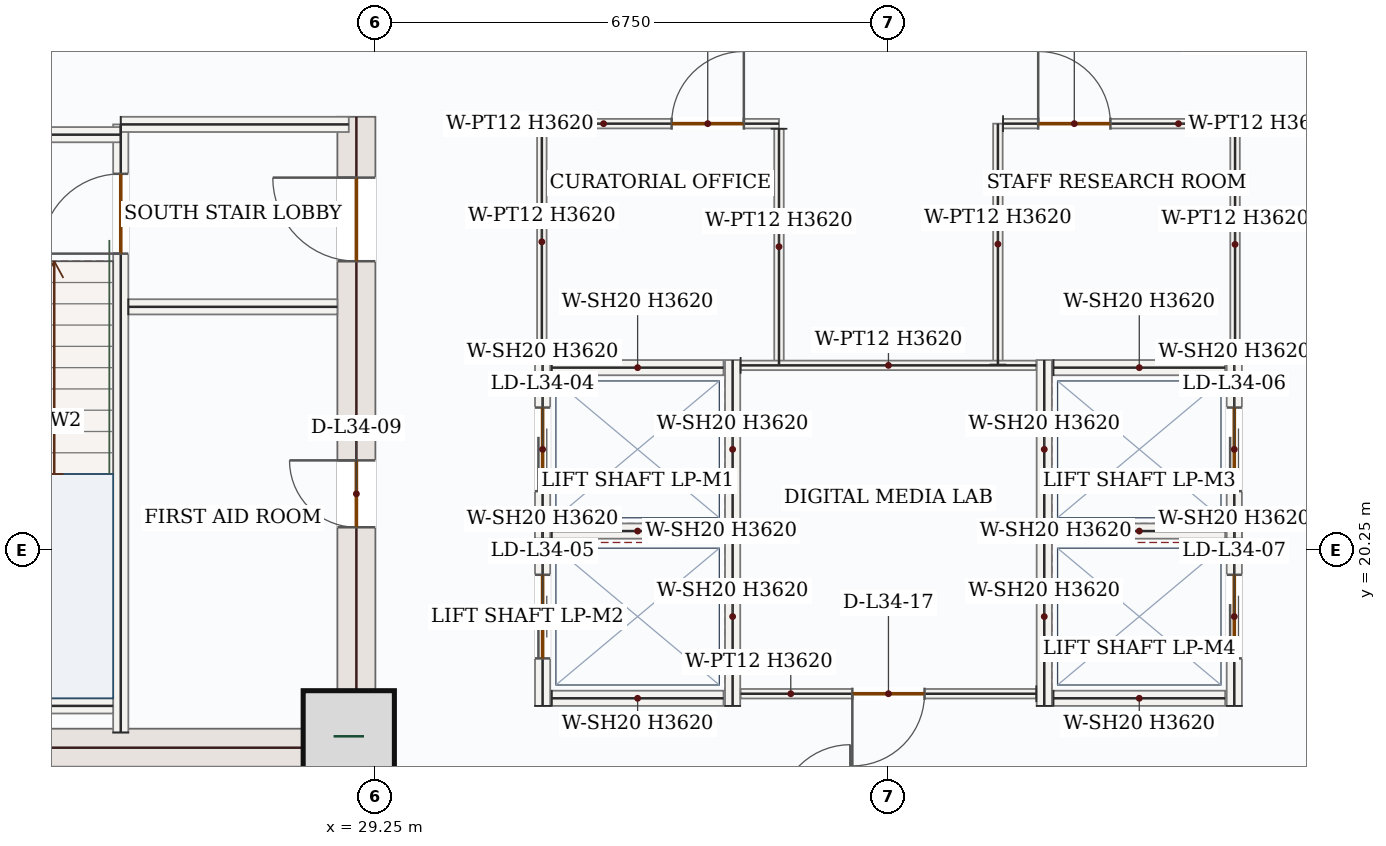
"""IFC4 building model, lengths in metres.
Left out: names, types, materials, properties, quantities, classifications, styles, units other than length and angle.
Written with IfcOpenShell. Run it as: python <this file> out.ifc"""

import sys

from ifc_helpers import new_model, si_unit, direction, frame, frame_2d, origin, origin_2d, place, context, subcontext, project, spatial, rectangle, extrude, source, transform, mapped, element, fill, save


model = new_model("IFC4")
c1 = context("Model", 3, precision=1e-05, world=origin(), true_north=direction((0.0, 1.0)))
c2 = subcontext(c1, "Body", "Model", "MODEL_VIEW")
j1 = project(units=[si_unit("LENGTHUNIT", "METRE"), si_unit("PLANEANGLEUNIT", "RADIAN")], contexts=[c1])
p1 = place(None, origin())
s1 = spatial("IfcSite", under=j1, at=p1, CompositionType="ELEMENT")
p2 = place(p1, origin())
s2 = spatial("IfcBuilding", under=s1, at=p2, CompositionType="ELEMENT")
p3 = place(p2, frame((0.0, 0.0, 151.2)))
s3 = spatial("IfcBuildingStorey", under=s2, at=p3, CompositionType="ELEMENT", Elevation=151.2)
p4 = place(p3, frame((29.0, 17.4, 0.0), z_axis=(0.0, 0.0, 1.0), x_axis=(0.0, 1.0, 0.0)))
e1 = element("IfcWall", 1, at=p4, inside=s3, PredefinedType="SHEAR", context=c2, shape_type="SweptSolid", body=[
    extrude(rectangle(XDim=8.55, YDim=0.5, at=frame_2d((4.275, 0.0))), origin(), (0.0, 0.0, 1.0), 3.62),
])
p5 = place(p4, frame((6.65, 0.0, 0.0)))
e2 = element("IfcOpeningElement", 2, at=p5, cuts=e1, PredefinedType="OPENING", context=c2, shape_type="SweptSolid", body=[
    extrude(rectangle(XDim=1.1, YDim=2.2, at=frame_2d((0.55, 1.1))), frame((0.0, 0.26, 0.0), z_axis=(0.0, -1.0, 0.0), x_axis=(1.0, 0.0, 0.0)), (0.0, 0.0, 1.0), 0.52),
])
p6 = place(p4, frame((3.15, 0.0, 0.0)))
e3 = element("IfcOpeningElement", 3, at=p6, cuts=e1, PredefinedType="OPENING", context=c2, shape_type="SweptSolid", body=[
    extrude(rectangle(XDim=0.88, YDim=2.1, at=frame_2d((0.44, 1.05))), frame((0.0, 0.26, 0.0), z_axis=(0.0, -1.0, 0.0), x_axis=(1.0, 0.0, 0.0)), (0.0, 0.0, 1.0), 0.52),
])
m1 = source(origin(), c2, "Body", "SweptSolid", [
    extrude(rectangle(XDim=7.0, YDim=0.5, at=frame_2d((3.5, 0.0))), origin(), (0.0, 0.0, 1.0), 3.62),
])
p7 = place(p3, frame((21.75, 17.65, 0.0), z_axis=(0.0, 0.0, 1.0), x_axis=(1.0, 0.0, 0.0)))
e4 = element("IfcWall", 4, at=p7, inside=s3, PredefinedType="SHEAR", context=c2, shape_type="MappedRepresentation", body=[
    mapped(m1, transform((0.0, 0.0, 0.0), x_axis=(1.0, 0.0, 0.0), y_axis=(0.0, 1.0, 0.0), z_axis=(0.0, 0.0, 1.0), scale=1.0)),
])
m2 = source(origin(), c2, "Body", "SweptSolid", [
    extrude(rectangle(XDim=1.2, YDim=1.2, at=origin_2d()), origin(), (0.0, 0.0, 1.0), 3.9),
])
p8 = place(p3, frame((28.9, 17.8, 0.0), z_axis=(0.0, 0.0, 1.0), x_axis=(1.0, 0.0, 0.0)))
e5 = element("IfcColumn", 5, at=p8, inside=s3, PredefinedType="COLUMN", context=c2, shape_type="MappedRepresentation", body=[
    mapped(m2, transform((0.0, 0.0, 0.0), x_axis=(1.0, 0.0, 0.0), y_axis=(0.0, 1.0, 0.0), z_axis=(0.0, 0.0, 1.0), scale=1.0)),
])
p9 = place(p3, frame((25.9, 17.85, 0.0), z_axis=(0.0, 0.0, 1.0), x_axis=(0.0, 1.0, 0.0)))
e6 = element("IfcWall", 6, at=p9, inside=s3, PredefinedType="SOLIDWALL", context=c2, shape_type="SweptSolid", body=[
    extrude(rectangle(XDim=8.0, YDim=0.2, at=frame_2d((4.0, 0.0))), origin(), (0.0, 0.0, 1.0), 3.62),
])
p10 = place(p9, frame((6.3, 0.0, 0.0)))
e7 = element("IfcOpeningElement", 7, at=p10, cuts=e6, PredefinedType="OPENING", context=c2, shape_type="SweptSolid", body=[
    extrude(rectangle(XDim=1.05, YDim=2.15, at=frame_2d((0.525, 1.075))), frame((0.0, 0.11, 0.0), z_axis=(0.0, -1.0, 0.0), x_axis=(1.0, 0.0, 0.0)), (0.0, 0.0, 1.0), 0.22),
])
m3 = source(origin(), c2, "Body", "SweptSolid", [
    extrude(rectangle(XDim=4.25, YDim=0.2, at=frame_2d((2.125, 0.0))), origin(), (0.0, 0.0, 1.0), 3.62),
])
p11 = place(p3, frame((21.65, 25.715, 0.0), z_axis=(0.0, 0.0, 1.0), x_axis=(1.0, 0.0, 0.0)))
e8 = element("IfcWall", 8, at=p11, inside=s3, PredefinedType="SOLIDWALL", context=c2, shape_type="MappedRepresentation", body=[
    mapped(m3, transform((0.0, 0.0, 0.0), x_axis=(1.0, 0.0, 0.0), y_axis=(0.0, 1.0, 0.0), z_axis=(0.0, 0.0, 1.0), scale=1.0)),
])
m4 = source(origin(), c2, "Body", "SweptSolid", [
    extrude(rectangle(XDim=3.0, YDim=0.2, at=frame_2d((1.5, 0.0))), origin(), (0.0, 0.0, 1.0), 3.62),
])
p12 = place(p3, frame((25.9, 25.85, 0.0), z_axis=(0.0, 0.0, 1.0), x_axis=(1.0, 0.0, 0.0)))
e9 = element("IfcWall", 9, at=p12, inside=s3, PredefinedType="SOLIDWALL", context=c2, shape_type="MappedRepresentation", body=[
    mapped(m4, transform((0.0, 0.0, 0.0), x_axis=(1.0, 0.0, 0.0), y_axis=(0.0, 1.0, 0.0), z_axis=(0.0, 0.0, 1.0), scale=1.0)),
])
m5 = source(origin(), c2, "Body", "SweptSolid", [
    extrude(rectangle(XDim=3.25, YDim=0.2, at=frame_2d((1.625, 0.0))), origin(), (0.0, 0.0, 1.0), 3.62),
])
p13 = place(p3, frame((22.55, 18.2, 0.0), z_axis=(0.0, 0.0, 1.0), x_axis=(1.0, 0.0, 0.0)))
e10 = element("IfcWall", 10, at=p13, inside=s3, PredefinedType="SOLIDWALL", context=c2, shape_type="MappedRepresentation", body=[
    mapped(m5, transform((0.0, 0.0, 0.0), x_axis=(1.0, 0.0, 0.0), y_axis=(0.0, 1.0, 0.0), z_axis=(0.0, 0.0, 1.0), scale=1.0)),
])
m6 = source(origin(), c2, "Body", "SweptSolid", [
    extrude(rectangle(XDim=2.75, YDim=0.2, at=frame_2d((1.375, 0.0))), origin(), (0.0, 0.0, 1.0), 3.62),
])
p14 = place(p3, frame((26.0, 23.45, 0.0), z_axis=(0.0, 0.0, 1.0), x_axis=(1.0, 0.0, 0.0)))
e11 = element("IfcWall", 11, at=p14, inside=s3, PredefinedType="SOLIDWALL", context=c2, shape_type="MappedRepresentation", body=[
    mapped(m6, transform((0.0, 0.0, 0.0), x_axis=(1.0, 0.0, 0.0), y_axis=(0.0, 1.0, 0.0), z_axis=(0.0, 0.0, 1.0), scale=1.0)),
])
p15 = place(p3, frame((31.45, 20.4, 0.0), z_axis=(0.0, 0.0, 1.0), x_axis=(0.0, 1.0, 0.0)))
e12 = element("IfcWall", 12, at=p15, inside=s3, PredefinedType="SOLIDWALL", context=c2, shape_type="SweptSolid", body=[
    extrude(rectangle(XDim=2.35, YDim=0.2, at=frame_2d((1.175, 0.0))), origin(), (0.0, 0.0, 1.0), 3.62),
])
p16 = place(p15, frame((0.625, 0.0, 0.0)))
e13 = element("IfcOpeningElement", 13, at=p16, cuts=e12, PredefinedType="OPENING", context=c2, shape_type="SweptSolid", body=[
    extrude(rectangle(XDim=1.1, YDim=2.15, at=frame_2d((0.55, 1.075))), frame((0.0, 0.11, 0.0), z_axis=(0.0, -1.0, 0.0), x_axis=(1.0, 0.0, 0.0)), (0.0, 0.0, 1.0), 0.22),
])
m7 = source(origin(), c2, "Body", "SweptSolid", [
    extrude(rectangle(XDim=2.35, YDim=0.2, at=frame_2d((1.175, 0.0))), origin(), (0.0, 0.0, 1.0), 3.62),
])
p17 = place(p3, frame((33.95, 20.4, 0.0), z_axis=(0.0, 0.0, 1.0), x_axis=(0.0, 1.0, 0.0)))
e14 = element("IfcWall", 14, at=p17, inside=s3, PredefinedType="SOLIDWALL", context=c2, shape_type="MappedRepresentation", body=[
    mapped(m7, transform((0.0, 0.0, 0.0), x_axis=(1.0, 0.0, 0.0), y_axis=(0.0, 1.0, 0.0), z_axis=(0.0, 0.0, 1.0), scale=1.0)),
])
m8 = source(origin(), c2, "Body", "SweptSolid", [
    extrude(rectangle(XDim=2.26, YDim=0.2, at=frame_2d((1.13, 0.0))), origin(), (0.0, 0.0, 1.0), 3.62),
])
for number, where, z_axis, x_axis in (
    (15, (31.57, 20.5, 0.0), (0.0, 0.0, 1.0), (1.0, 0.0, 0.0)),
    (16, (31.57, 22.65, 0.0), (0.0, 0.0, 1.0), (1.0, 0.0, 0.0)),
):
    element("IfcWall", number, at=place(p3, frame(where, z_axis=z_axis, x_axis=x_axis)), inside=s3, PredefinedType="SOLIDWALL", context=c2, shape_type="MappedRepresentation", body=[
        mapped(m8, transform((0.0, 0.0, 0.0), x_axis=(1.0, 0.0, 0.0), y_axis=(0.0, 1.0, 0.0), z_axis=(0.0, 0.0, 1.0), scale=1.0)),
    ])
p18 = place(p3, frame((31.45, 18.2, 0.0), z_axis=(0.0, 0.0, 1.0), x_axis=(0.0, 1.0, 0.0)))
e17 = element("IfcWall", 17, at=p18, inside=s3, PredefinedType="SOLIDWALL", context=c2, shape_type="SweptSolid", body=[
    extrude(rectangle(XDim=2.35, YDim=0.2, at=frame_2d((1.175, 0.0))), origin(), (0.0, 0.0, 1.0), 3.62),
])
p19 = place(p18, frame((0.625, 0.0, 0.0)))
e18 = element("IfcOpeningElement", 18, at=p19, cuts=e17, PredefinedType="OPENING", context=c2, shape_type="SweptSolid", body=[
    extrude(rectangle(XDim=1.1, YDim=2.15, at=frame_2d((0.55, 1.075))), frame((0.0, 0.11, 0.0), z_axis=(0.0, -1.0, 0.0), x_axis=(1.0, 0.0, 0.0)), (0.0, 0.0, 1.0), 0.22),
])
p20 = place(p3, frame((33.95, 18.2, 0.0), z_axis=(0.0, 0.0, 1.0), x_axis=(0.0, 1.0, 0.0)))
e19 = element("IfcWall", 19, at=p20, inside=s3, PredefinedType="SOLIDWALL", context=c2, shape_type="MappedRepresentation", body=[
    mapped(m7, transform((0.0, 0.0, 0.0), x_axis=(1.0, 0.0, 0.0), y_axis=(0.0, 1.0, 0.0), z_axis=(0.0, 0.0, 1.0), scale=1.0)),
])
p21 = place(p3, frame((31.57, 18.3, 0.0), z_axis=(0.0, 0.0, 1.0), x_axis=(1.0, 0.0, 0.0)))
e20 = element("IfcWall", 20, at=p21, inside=s3, PredefinedType="SOLIDWALL", context=c2, shape_type="MappedRepresentation", body=[
    mapped(m8, transform((0.0, 0.0, 0.0), x_axis=(1.0, 0.0, 0.0), y_axis=(0.0, 1.0, 0.0), z_axis=(0.0, 0.0, 1.0), scale=1.0)),
])
p22 = place(p3, frame((38.05, 20.4, 0.0), z_axis=(0.0, 0.0, 1.0), x_axis=(0.0, 1.0, 0.0)))
e21 = element("IfcWall", 21, at=p22, inside=s3, PredefinedType="SOLIDWALL", context=c2, shape_type="MappedRepresentation", body=[
    mapped(m7, transform((0.0, 0.0, 0.0), x_axis=(1.0, 0.0, 0.0), y_axis=(0.0, 1.0, 0.0), z_axis=(0.0, 0.0, 1.0), scale=1.0)),
])
p23 = place(p3, frame((40.55, 20.4, 0.0), z_axis=(0.0, 0.0, 1.0), x_axis=(0.0, 1.0, 0.0)))
e22 = element("IfcWall", 22, at=p23, inside=s3, PredefinedType="SOLIDWALL", context=c2, shape_type="SweptSolid", body=[
    extrude(rectangle(XDim=2.35, YDim=0.2, at=frame_2d((1.175, 0.0))), origin(), (0.0, 0.0, 1.0), 3.62),
])
p24 = place(p23, frame((0.625, 0.0, 0.0)))
e23 = element("IfcOpeningElement", 23, at=p24, cuts=e22, PredefinedType="OPENING", context=c2, shape_type="SweptSolid", body=[
    extrude(rectangle(XDim=1.1, YDim=2.15, at=frame_2d((0.55, 1.075))), frame((0.0, 0.11, 0.0), z_axis=(0.0, -1.0, 0.0), x_axis=(1.0, 0.0, 0.0)), (0.0, 0.0, 1.0), 0.22),
])
for number, where, z_axis, x_axis in (
    (24, (38.17, 20.5, 0.0), (0.0, 0.0, 1.0), (1.0, 0.0, 0.0)),
    (25, (38.17, 22.65, 0.0), (0.0, 0.0, 1.0), (1.0, 0.0, 0.0)),
):
    element("IfcWall", number, at=place(p3, frame(where, z_axis=z_axis, x_axis=x_axis)), inside=s3, PredefinedType="SOLIDWALL", context=c2, shape_type="MappedRepresentation", body=[
        mapped(m8, transform((0.0, 0.0, 0.0), x_axis=(1.0, 0.0, 0.0), y_axis=(0.0, 1.0, 0.0), z_axis=(0.0, 0.0, 1.0), scale=1.0)),
    ])
p25 = place(p3, frame((38.05, 18.2, 0.0), z_axis=(0.0, 0.0, 1.0), x_axis=(0.0, 1.0, 0.0)))
e26 = element("IfcWall", 26, at=p25, inside=s3, PredefinedType="SOLIDWALL", context=c2, shape_type="MappedRepresentation", body=[
    mapped(m7, transform((0.0, 0.0, 0.0), x_axis=(1.0, 0.0, 0.0), y_axis=(0.0, 1.0, 0.0), z_axis=(0.0, 0.0, 1.0), scale=1.0)),
])
p26 = place(p3, frame((40.55, 18.2, 0.0), z_axis=(0.0, 0.0, 1.0), x_axis=(0.0, 1.0, 0.0)))
e27 = element("IfcWall", 27, at=p26, inside=s3, PredefinedType="SOLIDWALL", context=c2, shape_type="SweptSolid", body=[
    extrude(rectangle(XDim=2.35, YDim=0.2, at=frame_2d((1.175, 0.0))), origin(), (0.0, 0.0, 1.0), 3.62),
])
p27 = place(p26, frame((0.625, 0.0, 0.0)))
e28 = element("IfcOpeningElement", 28, at=p27, cuts=e27, PredefinedType="OPENING", context=c2, shape_type="SweptSolid", body=[
    extrude(rectangle(XDim=1.1, YDim=2.15, at=frame_2d((0.55, 1.075))), frame((0.0, 0.11, 0.0), z_axis=(0.0, -1.0, 0.0), x_axis=(1.0, 0.0, 0.0)), (0.0, 0.0, 1.0), 0.22),
])
p28 = place(p3, frame((38.17, 18.3, 0.0), z_axis=(0.0, 0.0, 1.0), x_axis=(1.0, 0.0, 0.0)))
e29 = element("IfcWall", 29, at=p28, inside=s3, PredefinedType="SOLIDWALL", context=c2, shape_type="MappedRepresentation", body=[
    mapped(m8, transform((0.0, 0.0, 0.0), x_axis=(1.0, 0.0, 0.0), y_axis=(0.0, 1.0, 0.0), z_axis=(0.0, 0.0, 1.0), scale=1.0)),
])
m9 = source(origin(), c2, "Body", "SweptSolid", [
    extrude(rectangle(XDim=3.11, YDim=0.125, at=frame_2d((1.555, 0.0))), origin(), (0.0, 0.0, 1.0), 3.62),
])
p29 = place(p3, frame((31.44, 22.75, 0.0), z_axis=(0.0, 0.0, 1.0), x_axis=(0.0, 1.0, 0.0)))
e30 = element("IfcWall", 30, at=p29, inside=s3, PredefinedType="PARTITIONING", context=c2, shape_type="MappedRepresentation", body=[
    mapped(m9, transform((0.0, 0.0, 0.0), x_axis=(1.0, 0.0, 0.0), y_axis=(0.0, 1.0, 0.0), z_axis=(0.0, 0.0, 1.0), scale=1.0)),
])
p30 = place(p3, frame((31.508, 25.86, 0.0), z_axis=(0.0, 0.0, 1.0), x_axis=(1.0, 0.0, 0.0)))
e31 = element("IfcWall", 31, at=p30, inside=s3, PredefinedType="PARTITIONING", context=c2, shape_type="SweptSolid", body=[
    extrude(rectangle(XDim=3.052, YDim=0.125, at=frame_2d((1.526, 0.0))), origin(), (0.0, 0.0, 1.0), 3.62),
])
p31 = place(p30, frame((1.64, 0.0, 0.0)))
e32 = element("IfcOpeningElement", 32, at=p31, cuts=e31, PredefinedType="OPENING", context=c2, shape_type="SweptSolid", body=[
    extrude(rectangle(XDim=0.95, YDim=2.15, at=frame_2d((0.475, 1.075))), frame((0.0, 0.073, 0.0), z_axis=(0.0, -1.0, 0.0), x_axis=(1.0, 0.0, 0.0)), (0.0, 0.0, 1.0), 0.145),
])
m10 = source(origin(), c2, "Body", "SweptSolid", [
    extrude(rectangle(XDim=3.103, YDim=0.125, at=frame_2d((1.551, 0.0))), origin(), (0.0, 0.0, 1.0), 3.62),
])
p32 = place(p3, frame((34.56, 25.792, 0.0), z_axis=(0.0, 0.0, 1.0), x_axis=(0.0, -1.0, 0.0)))
e33 = element("IfcWall", 33, at=p32, inside=s3, PredefinedType="PARTITIONING", context=c2, shape_type="MappedRepresentation", body=[
    mapped(m10, transform((0.0, 0.0, 0.0), x_axis=(1.0, 0.0, 0.0), y_axis=(0.0, 1.0, 0.0), z_axis=(0.0, 0.0, 1.0), scale=1.0)),
])
m11 = source(origin(), c2, "Body", "SweptSolid", [
    extrude(rectangle(XDim=3.17, YDim=0.125, at=frame_2d((1.585, 0.0))), origin(), (0.0, 0.0, 1.0), 3.62),
])
p33 = place(p3, frame((37.44, 22.69, 0.0), z_axis=(0.0, 0.0, 1.0), x_axis=(0.0, 1.0, 0.0)))
e34 = element("IfcWall", 34, at=p33, inside=s3, PredefinedType="PARTITIONING", context=c2, shape_type="MappedRepresentation", body=[
    mapped(m11, transform((0.0, 0.0, 0.0), x_axis=(1.0, 0.0, 0.0), y_axis=(0.0, 1.0, 0.0), z_axis=(0.0, 0.0, 1.0), scale=1.0)),
])
p34 = place(p3, frame((37.508, 25.86, 0.0), z_axis=(0.0, 0.0, 1.0), x_axis=(1.0, 0.0, 0.0)))
e35 = element("IfcWall", 35, at=p34, inside=s3, PredefinedType="PARTITIONING", context=c2, shape_type="SweptSolid", body=[
    extrude(rectangle(XDim=3.052, YDim=0.125, at=frame_2d((1.526, 0.0))), origin(), (0.0, 0.0, 1.0), 3.62),
])
p35 = place(p34, frame((0.463, 0.0, 0.0)))
e36 = element("IfcOpeningElement", 36, at=p35, cuts=e35, PredefinedType="OPENING", context=c2, shape_type="SweptSolid", body=[
    extrude(rectangle(XDim=0.95, YDim=2.15, at=frame_2d((0.475, 1.075))), frame((0.0, 0.073, 0.0), z_axis=(0.0, -1.0, 0.0), x_axis=(1.0, 0.0, 0.0)), (0.0, 0.0, 1.0), 0.145),
])
m12 = source(origin(), c2, "Body", "SweptSolid", [
    extrude(rectangle(XDim=3.042, YDim=0.125, at=frame_2d((1.521, 0.0))), origin(), (0.0, 0.0, 1.0), 3.62),
])
p36 = place(p3, frame((40.56, 25.792, 0.0), z_axis=(0.0, 0.0, 1.0), x_axis=(0.0, -1.0, 0.0)))
e37 = element("IfcWall", 37, at=p36, inside=s3, PredefinedType="PARTITIONING", context=c2, shape_type="MappedRepresentation", body=[
    mapped(m12, transform((0.0, 0.0, 0.0), x_axis=(1.0, 0.0, 0.0), y_axis=(0.0, 1.0, 0.0), z_axis=(0.0, 0.0, 1.0), scale=1.0)),
])
m13 = source(origin(), c2, "Body", "SweptSolid", [
    extrude(rectangle(XDim=3.89, YDim=0.125, at=frame_2d((1.945, 0.0))), origin(), (0.0, 0.0, 1.0), 3.62),
])
p37 = place(p3, frame((34.055, 22.68, 0.0), z_axis=(0.0, 0.0, 1.0), x_axis=(1.0, 0.0, 0.0)))
e38 = element("IfcWall", 38, at=p37, inside=s3, PredefinedType="PARTITIONING", context=c2, shape_type="MappedRepresentation", body=[
    mapped(m13, transform((0.0, 0.0, 0.0), x_axis=(1.0, 0.0, 0.0), y_axis=(0.0, 1.0, 0.0), z_axis=(0.0, 0.0, 1.0), scale=1.0)),
])
p38 = place(p3, frame((37.945, 18.36, 0.0), z_axis=(0.0, 0.0, 1.0), x_axis=(-1.0, 0.0, 0.0)))
e39 = element("IfcWall", 39, at=p38, inside=s3, PredefinedType="PARTITIONING", context=c2, shape_type="SweptSolid", body=[
    extrude(rectangle(XDim=3.89, YDim=0.125, at=frame_2d((1.945, 0.0))), origin(), (0.0, 0.0, 1.0), 3.62),
])
p39 = place(p38, frame((1.47, 0.0, 0.0)))
e40 = element("IfcOpeningElement", 40, at=p39, cuts=e39, PredefinedType="OPENING", context=c2, shape_type="SweptSolid", body=[
    extrude(rectangle(XDim=0.95, YDim=2.15, at=frame_2d((0.475, 1.075))), frame((0.0, 0.073, 0.0), z_axis=(0.0, -1.0, 0.0), x_axis=(1.0, 0.0, 0.0)), (0.0, 0.0, 1.0), 0.145),
])
m14 = source(origin(), c2, "Body", "SweptSolid", [
    extrude(rectangle(XDim=1.05, YDim=2.15, at=frame_2d((0.525, 1.075))), frame((0.0, 0.025, 0.0), z_axis=(0.0, -1.0, 0.0), x_axis=(1.0, 0.0, 0.0)), (0.0, 0.0, 1.0), 0.05),
])
p40 = place(p10, origin())
e41 = element("IfcDoor", 41, at=p40, inside=s3, OperationType="SINGLE_SWING_LEFT", PredefinedType="DOOR", context=c2, shape_type="MappedRepresentation", body=[
    mapped(m14, transform((0.0, 0.0, 0.0), x_axis=(1.0, 0.0, 0.0), y_axis=(0.0, 1.0, 0.0), z_axis=(0.0, 0.0, 1.0), scale=1.0)),
])
fill(e7, e41)
m15 = source(origin(), c2, "Body", "SweptSolid", [
    extrude(rectangle(XDim=1.1, YDim=2.2, at=frame_2d((0.55, 1.1))), frame((0.0, 0.025, 0.0), z_axis=(0.0, -1.0, 0.0), x_axis=(1.0, 0.0, 0.0)), (0.0, 0.0, 1.0), 0.05),
])
p41 = place(p5, origin())
e42 = element("IfcDoor", 42, at=p41, inside=s3, OperationType="SINGLE_SWING_RIGHT", PredefinedType="DOOR", context=c2, shape_type="MappedRepresentation", body=[
    mapped(m15, transform((0.0, 0.0, 0.0), x_axis=(1.0, 0.0, 0.0), y_axis=(0.0, 1.0, 0.0), z_axis=(0.0, 0.0, 1.0), scale=1.0)),
])
fill(e2, e42)
m16 = source(origin(), c2, "Body", "SweptSolid", [
    extrude(rectangle(XDim=0.88, YDim=2.1, at=frame_2d((0.44, 1.05))), frame((0.0, 0.025, 0.0), z_axis=(0.0, -1.0, 0.0), x_axis=(1.0, 0.0, 0.0)), (0.0, 0.0, 1.0), 0.05),
])
p42 = place(p6, origin())
e43 = element("IfcDoor", 43, at=p42, inside=s3, OperationType="SINGLE_SWING_RIGHT", PredefinedType="DOOR", context=c2, shape_type="MappedRepresentation", body=[
    mapped(m16, transform((0.0, 0.0, 0.0), x_axis=(1.0, 0.0, 0.0), y_axis=(0.0, 1.0, 0.0), z_axis=(0.0, 0.0, 1.0), scale=1.0)),
])
fill(e3, e43)
m17 = source(origin(), c2, "Body", "SweptSolid", [
    extrude(rectangle(XDim=1.1, YDim=2.15, at=frame_2d((0.55, 1.075))), frame((0.0, 0.025, 0.0), z_axis=(0.0, -1.0, 0.0), x_axis=(1.0, 0.0, 0.0)), (0.0, 0.0, 1.0), 0.05),
])
p43 = place(p16, origin())
e44 = element("IfcDoor", 44, at=p43, inside=s3, OperationType="DOUBLE_DOOR_SLIDING", PredefinedType="DOOR", context=c2, shape_type="MappedRepresentation", body=[
    mapped(m17, transform((0.0, 0.0, 0.0), x_axis=(1.0, 0.0, 0.0), y_axis=(0.0, 1.0, 0.0), z_axis=(0.0, 0.0, 1.0), scale=1.0)),
])
fill(e13, e44)
p44 = place(p19, origin())
e45 = element("IfcDoor", 45, at=p44, inside=s3, OperationType="DOUBLE_DOOR_SLIDING", PredefinedType="DOOR", context=c2, shape_type="MappedRepresentation", body=[
    mapped(m17, transform((0.0, 0.0, 0.0), x_axis=(1.0, 0.0, 0.0), y_axis=(0.0, 1.0, 0.0), z_axis=(0.0, 0.0, 1.0), scale=1.0)),
])
fill(e18, e45)
p45 = place(p24, origin())
e46 = element("IfcDoor", 46, at=p45, inside=s3, OperationType="DOUBLE_DOOR_SLIDING", PredefinedType="DOOR", context=c2, shape_type="MappedRepresentation", body=[
    mapped(m17, transform((0.0, 0.0, 0.0), x_axis=(1.0, 0.0, 0.0), y_axis=(0.0, 1.0, 0.0), z_axis=(0.0, 0.0, 1.0), scale=1.0)),
])
fill(e23, e46)
p46 = place(p27, origin())
e47 = element("IfcDoor", 47, at=p46, inside=s3, OperationType="DOUBLE_DOOR_SLIDING", PredefinedType="DOOR", context=c2, shape_type="MappedRepresentation", body=[
    mapped(m17, transform((0.0, 0.0, 0.0), x_axis=(1.0, 0.0, 0.0), y_axis=(0.0, 1.0, 0.0), z_axis=(0.0, 0.0, 1.0), scale=1.0)),
])
fill(e28, e47)
m18 = source(origin(), c2, "Body", "SweptSolid", [
    extrude(rectangle(XDim=0.95, YDim=2.15, at=frame_2d((0.475, 1.075))), frame((0.0, 0.025, 0.0), z_axis=(0.0, -1.0, 0.0), x_axis=(1.0, 0.0, 0.0)), (0.0, 0.0, 1.0), 0.05),
])
p47 = place(p31, origin())
e48 = element("IfcDoor", 48, at=p47, inside=s3, OperationType="SINGLE_SWING_RIGHT", PredefinedType="DOOR", context=c2, shape_type="MappedRepresentation", body=[
    mapped(m18, transform((0.0, 0.0, 0.0), x_axis=(1.0, 0.0, 0.0), y_axis=(0.0, 1.0, 0.0), z_axis=(0.0, 0.0, 1.0), scale=1.0)),
])
fill(e32, e48)
p48 = place(p35, origin())
e49 = element("IfcDoor", 49, at=p48, inside=s3, OperationType="SINGLE_SWING_LEFT", PredefinedType="DOOR", context=c2, shape_type="MappedRepresentation", body=[
    mapped(m18, transform((0.0, 0.0, 0.0), x_axis=(1.0, 0.0, 0.0), y_axis=(0.0, 1.0, 0.0), z_axis=(0.0, 0.0, 1.0), scale=1.0)),
])
fill(e36, e49)
p49 = place(p39, origin())
e50 = element("IfcDoor", 50, at=p49, inside=s3, OperationType="SINGLE_SWING_RIGHT", PredefinedType="DOOR", context=c2, shape_type="MappedRepresentation", body=[
    mapped(m18, transform((0.0, 0.0, 0.0), x_axis=(1.0, 0.0, 0.0), y_axis=(0.0, 1.0, 0.0), z_axis=(0.0, 0.0, 1.0), scale=1.0)),
])
fill(e40, e50)
save(model, sys.argv[1])
